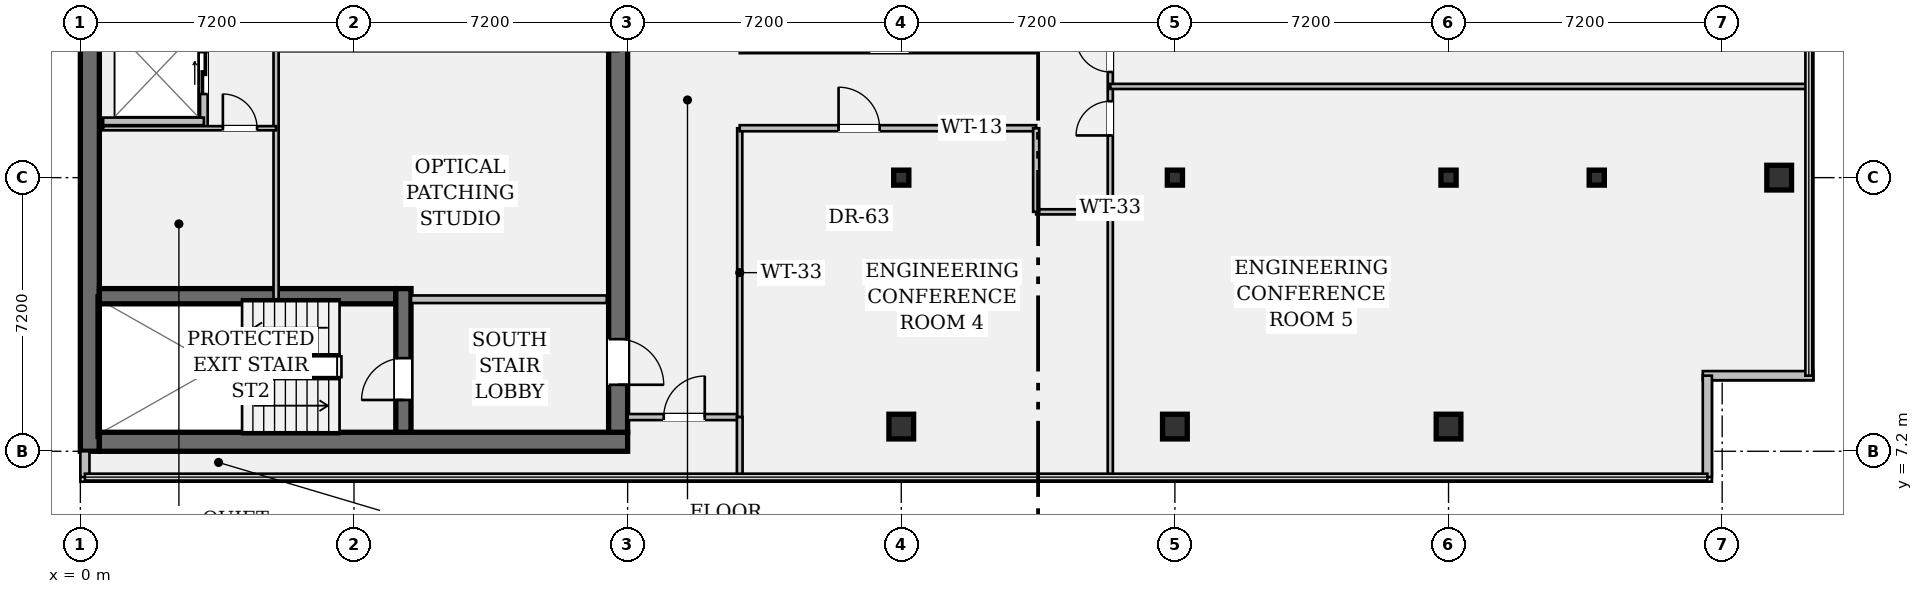
"""IFC4 building model, lengths in metres.
Left out: names, types, materials, properties, quantities, classifications, styles, units other than length and angle.
Written with IfcOpenShell. Run it as: python <this file> out.ifc"""

import sys

from ifc_helpers import new_model, si_unit, direction, frame, frame_2d, origin, origin_2d, place, context, subcontext, project, spatial, rectangle, hollow_rectangle, i_section, extrude, element, fill, save


model = new_model("IFC4")
c1 = context("Model", 3, precision=1e-05, world=origin(), true_north=direction((0.0, 1.0)))
c2 = subcontext(c1, "Body", "Model", "MODEL_VIEW")
j1 = project(units=[si_unit("LENGTHUNIT", "METRE"), si_unit("PLANEANGLEUNIT", "RADIAN")], contexts=[c1])
p1 = place(None, origin())
s1 = spatial("IfcSite", under=j1, at=p1, CompositionType="ELEMENT")
p2 = place(p1, origin())
s2 = spatial("IfcBuilding", under=s1, at=p2, CompositionType="ELEMENT")
p3 = place(p2, frame((0.0, 0.0, 279.65)))
s3 = spatial("IfcBuildingStorey", under=s2, at=p3, CompositionType="ELEMENT", Elevation=279.65)
p4 = place(p3, frame((0.25, 7.2, 0.0), z_axis=(0.0, 0.0, 1.0), x_axis=(0.0, 1.0, 0.0)))
e1 = element("IfcWall", 1, at=p4, inside=s3, PredefinedType="SHEAR", context=c2, shape_type="SweptSolid", body=[
    extrude(rectangle(XDim=28.8, YDim=0.5, at=frame_2d((14.4, 0.0))), origin(), (0.0, 0.0, 1.0), 3.24),
])
p5 = place(p3, frame((0.5, 7.45, 0.0), z_axis=(0.0, 0.0, 1.0), x_axis=(1.0, 0.0, 0.0)))
e2 = element("IfcWall", 2, at=p5, inside=s3, PredefinedType="SHEAR", context=c2, shape_type="SweptSolid", body=[
    extrude(rectangle(XDim=13.9, YDim=0.5, at=frame_2d((6.95, 0.0))), origin(), (0.0, 0.0, 1.0), 3.24),
])
p6 = place(p3, frame((14.15, 35.5, 0.0), z_axis=(0.0, 0.0, 1.0), x_axis=(0.0, -1.0, 0.0)))
e3 = element("IfcWall", 3, at=p6, inside=s3, PredefinedType="SHEAR", context=c2, shape_type="SweptSolid", body=[
    extrude(rectangle(XDim=27.8, YDim=0.5, at=frame_2d((13.9, 0.0))), origin(), (0.0, 0.0, 1.0), 3.24),
])
p7 = place(p6, frame((1.4, 0.0, 0.0)))
e4 = element("IfcOpeningElement", 4, at=p7, cuts=e3, PredefinedType="OPENING", context=c2, shape_type="SweptSolid", body=[
    extrude(rectangle(XDim=1.2, YDim=2.15, at=frame_2d((0.6, 1.075))), frame((0.0, 0.262, 0.0), z_axis=(0.0, -1.0, 0.0), x_axis=(1.0, 0.0, 0.0)), (0.0, 0.0, 1.0), 0.524),
])
p8 = place(p6, frame((25.35, 0.0, 0.0)))
e5 = element("IfcOpeningElement", 5, at=p8, cuts=e3, PredefinedType="OPENING", context=c2, shape_type="SweptSolid", body=[
    extrude(rectangle(XDim=1.2, YDim=2.15, at=frame_2d((0.6, 1.075))), frame((0.0, 0.262, 0.0), z_axis=(0.0, -1.0, 0.0), x_axis=(1.0, 0.0, 0.0)), (0.0, 0.0, 1.0), 0.524),
])
p9 = place(p6, frame((14.7, 0.0, 0.0)))
e6 = element("IfcOpeningElement", 6, at=p9, cuts=e3, PredefinedType="OPENING", context=c2, shape_type="SweptSolid", body=[
    extrude(rectangle(XDim=1.6, YDim=2.2, at=frame_2d((0.8, 1.1))), frame((0.0, 0.262, 0.0), z_axis=(0.0, -1.0, 0.0), x_axis=(1.0, 0.0, 0.0)), (0.0, 0.0, 1.0), 0.524),
])
p10 = place(p3, frame((0.5, 11.28, 0.0), z_axis=(0.0, 0.0, 1.0), x_axis=(1.0, 0.0, 0.0)))
e7 = element("IfcWall", 7, at=p10, inside=s3, PredefinedType="SHEAR", context=c2, shape_type="SweptSolid", body=[
    extrude(rectangle(XDim=7.8, YDim=0.4, at=frame_2d((3.9, 0.0))), origin(), (0.0, 0.0, 1.0), 3.24),
])
p11 = place(p3, frame((8.5, 7.7, 0.0), z_axis=(0.0, 0.0, 1.0), x_axis=(0.0, 1.0, 0.0)))
e8 = element("IfcWall", 8, at=p11, inside=s3, PredefinedType="SHEAR", context=c2, shape_type="SweptSolid", body=[
    extrude(rectangle(XDim=3.78, YDim=0.4, at=frame_2d((1.89, 0.0))), origin(), (0.0, 0.0, 1.0), 3.24),
])
p12 = place(p11, frame((0.85, 0.0, 0.0)))
e9 = element("IfcOpeningElement", 9, at=p12, cuts=e8, PredefinedType="OPENING", context=c2, shape_type="SweptSolid", body=[
    extrude(rectangle(XDim=1.1, YDim=2.15, at=frame_2d((0.55, 1.075))), frame((0.0, 0.212, 0.0), z_axis=(0.0, -1.0, 0.0), x_axis=(1.0, 0.0, 0.0)), (0.0, 0.0, 1.0), 0.424),
])
p13 = place(p3, frame((21.6, 7.85, 0.0), z_axis=(0.0, 0.0, 1.0), x_axis=(1.0, 0.0, 0.0)))
e10 = element("IfcColumn", 10, at=p13, inside=s3, PredefinedType="COLUMN", context=c2, shape_type="SweptSolid", body=[
    extrude(hollow_rectangle(XDim=0.65, YDim=0.65, WallThickness=0.04, at=origin_2d()), origin(), (0.0, 0.0, 1.0), 3.24),
])
p14 = place(p3, frame((21.6, 14.4, 0.0), z_axis=(0.0, 0.0, 1.0), x_axis=(1.0, 0.0, 0.0)))
e11 = element("IfcColumn", 11, at=p14, inside=s3, PredefinedType="COLUMN", context=c2, shape_type="SweptSolid", body=[
    extrude(i_section(OverallWidth=0.399, OverallDepth=0.394, WebThickness=0.023, FlangeThickness=0.037, FilletRadius=0.018, at=origin_2d()), origin(), (0.0, 0.0, 1.0), 3.24),
])
p15 = place(p3, frame((28.8, 7.85, 0.0), z_axis=(0.0, 0.0, 1.0), x_axis=(1.0, 0.0, 0.0)))
e12 = element("IfcColumn", 12, at=p15, inside=s3, PredefinedType="COLUMN", context=c2, shape_type="SweptSolid", body=[
    extrude(hollow_rectangle(XDim=0.65, YDim=0.65, WallThickness=0.04, at=origin_2d()), origin(), (0.0, 0.0, 1.0), 3.24),
])
p16 = place(p3, frame((28.8, 14.4, 0.0), z_axis=(0.0, 0.0, 1.0), x_axis=(1.0, 0.0, 0.0)))
e13 = element("IfcColumn", 13, at=p16, inside=s3, PredefinedType="COLUMN", context=c2, shape_type="SweptSolid", body=[
    extrude(i_section(OverallWidth=0.399, OverallDepth=0.394, WebThickness=0.023, FlangeThickness=0.037, FilletRadius=0.018, at=origin_2d()), origin(), (0.0, 0.0, 1.0), 3.24),
])
p17 = place(p3, frame((36.0, 7.85, 0.0), z_axis=(0.0, 0.0, 1.0), x_axis=(1.0, 0.0, 0.0)))
e14 = element("IfcColumn", 14, at=p17, inside=s3, PredefinedType="COLUMN", context=c2, shape_type="SweptSolid", body=[
    extrude(hollow_rectangle(XDim=0.65, YDim=0.65, WallThickness=0.04, at=origin_2d()), origin(), (0.0, 0.0, 1.0), 3.24),
])
for number, where, z_axis, x_axis in (
    (15, (36.0, 14.4, 0.0), (0.0, 0.0, 1.0), (1.0, 0.0, 0.0)),
    (16, (39.9, 14.4, 0.0), (0.0, 0.0, 1.0), (1.0, 0.0, 0.0)),
):
    element("IfcColumn", number, at=place(p3, frame(where, z_axis=z_axis, x_axis=x_axis)), inside=s3, PredefinedType="COLUMN", context=c2, shape_type="SweptSolid", body=[
        extrude(i_section(OverallWidth=0.399, OverallDepth=0.394, WebThickness=0.023, FlangeThickness=0.037, FilletRadius=0.018, at=origin_2d()), origin(), (0.0, 0.0, 1.0), 3.24),
    ])
p18 = place(p3, frame((44.7, 14.4, 0.0), z_axis=(0.0, 0.0, 1.0), x_axis=(1.0, 0.0, 0.0)))
e17 = element("IfcColumn", 17, at=p18, inside=s3, PredefinedType="COLUMN", context=c2, shape_type="SweptSolid", body=[
    extrude(hollow_rectangle(XDim=0.65, YDim=0.65, WallThickness=0.04, at=origin_2d()), origin(), (0.0, 0.0, 1.0), 3.24),
])
p19 = place(p3, frame((0.12, 6.52, 0.0), z_axis=(0.0, 0.0, 1.0), x_axis=(0.0, 1.0, 0.0)))
e18 = element("IfcWall", 18, at=p19, inside=s3, PredefinedType="STANDARD", context=c2, shape_type="SweptSolid", body=[
    extrude(rectangle(XDim=0.68, YDim=0.24, at=frame_2d((0.34, 0.0))), origin(), (0.0, 0.0, 1.0), 3.24),
])
p20 = place(p3, frame((45.6, 9.19, 0.0), z_axis=(0.0, 0.0, 1.0), x_axis=(-1.0, 0.0, 0.0)))
e19 = element("IfcWall", 19, at=p20, inside=s3, PredefinedType="STANDARD", context=c2, shape_type="SweptSolid", body=[
    extrude(rectangle(XDim=2.91, YDim=0.24, at=frame_2d((1.455, 0.0))), origin(), (0.0, 0.0, 1.0), 3.24),
])
p21 = place(p3, frame((42.81, 9.19, 0.0), z_axis=(0.0, 0.0, 1.0), x_axis=(0.0, -1.0, 0.0)))
e20 = element("IfcWall", 20, at=p21, inside=s3, PredefinedType="STANDARD", context=c2, shape_type="SweptSolid", body=[
    extrude(rectangle(XDim=2.67, YDim=0.24, at=frame_2d((1.335, 0.0))), origin(), (0.0, 0.0, 1.0), 3.24),
])
p22 = place(p3, frame((8.7, 11.2, 0.0), z_axis=(0.0, 0.0, 1.0), x_axis=(1.0, 0.0, 0.0)))
e21 = element("IfcWall", 21, at=p22, inside=s3, PredefinedType="PARTITIONING", context=c2, shape_type="SweptSolid", body=[
    extrude(rectangle(XDim=5.15, YDim=0.2, at=frame_2d((2.575, 0.0))), origin(), (0.0, 0.0, 1.0), 3.24),
])
p23 = place(p3, frame((3.25, 15.7, 0.0), z_axis=(0.0, 0.0, 1.0), x_axis=(0.0, 1.0, 0.0)))
e22 = element("IfcWall", 22, at=p23, inside=s3, PredefinedType="PARTITIONING", context=c2, shape_type="SweptSolid", body=[
    extrude(rectangle(XDim=13.08, YDim=0.2, at=frame_2d((6.54, 0.0))), origin(), (0.0, 0.0, 1.0), 3.24),
])
p24 = place(p23, frame((0.9, 0.0, 0.0)))
e23 = element("IfcOpeningElement", 23, at=p24, cuts=e22, PredefinedType="OPENING", context=c2, shape_type="SweptSolid", body=[
    extrude(rectangle(XDim=1.1, YDim=2.2, at=frame_2d((0.55, 1.1))), frame((0.0, 0.112, 0.0), z_axis=(0.0, -1.0, 0.0), x_axis=(1.0, 0.0, 0.0)), (0.0, 0.0, 1.0), 0.224),
])
p25 = place(p23, frame((3.5, 0.0, 0.0)))
e24 = element("IfcOpeningElement", 24, at=p25, cuts=e22, PredefinedType="OPENING", context=c2, shape_type="SweptSolid", body=[
    extrude(rectangle(XDim=1.1, YDim=2.2, at=frame_2d((0.55, 1.1))), frame((0.0, 0.112, 0.0), z_axis=(0.0, -1.0, 0.0), x_axis=(1.0, 0.0, 0.0)), (0.0, 0.0, 1.0), 0.224),
])
p26 = place(p23, frame((7.2, 0.0, 0.0)))
e25 = element("IfcOpeningElement", 25, at=p26, cuts=e22, PredefinedType="OPENING", context=c2, shape_type="SweptSolid", body=[
    extrude(rectangle(XDim=1.1, YDim=2.2, at=frame_2d((0.55, 1.1))), frame((0.0, 0.112, 0.0), z_axis=(0.0, -1.0, 0.0), x_axis=(1.0, 0.0, 0.0)), (0.0, 0.0, 1.0), 0.224),
])
p27 = place(p23, frame((9.8, 0.0, 0.0)))
e26 = element("IfcOpeningElement", 26, at=p27, cuts=e22, PredefinedType="OPENING", context=c2, shape_type="SweptSolid", body=[
    extrude(rectangle(XDim=1.1, YDim=2.2, at=frame_2d((0.55, 1.1))), frame((0.0, 0.112, 0.0), z_axis=(0.0, -1.0, 0.0), x_axis=(1.0, 0.0, 0.0)), (0.0, 0.0, 1.0), 0.224),
])
p28 = place(p3, frame((0.6, 15.88, 0.0), z_axis=(0.0, 0.0, 1.0), x_axis=(1.0, 0.0, 0.0)))
e27 = element("IfcWall", 27, at=p28, inside=s3, PredefinedType="PARTITIONING", context=c2, shape_type="SweptSolid", body=[
    extrude(rectangle(XDim=2.65, YDim=0.2, at=frame_2d((1.325, 0.0))), origin(), (0.0, 0.0, 1.0), 3.24),
])
p29 = place(p3, frame((5.15, 11.2, 0.0), z_axis=(0.0, 0.0, 1.0), x_axis=(0.0, 1.0, 0.0)))
e28 = element("IfcWall", 28, at=p29, inside=s3, PredefinedType="PARTITIONING", context=c2, shape_type="SweptSolid", body=[
    extrude(rectangle(XDim=6.6, YDim=0.135, at=frame_2d((3.3, 0.0))), origin(), (0.0, 0.0, 1.0), 3.24),
])
p30 = place(p3, frame((0.6, 15.7, 0.0), z_axis=(0.0, 0.0, 1.0), x_axis=(1.0, 0.0, 0.0)))
e29 = element("IfcWall", 29, at=p30, inside=s3, PredefinedType="PARTITIONING", context=c2, shape_type="SweptSolid", body=[
    extrude(rectangle(XDim=4.55, YDim=0.11, at=frame_2d((2.275, 0.0))), origin(), (0.0, 0.0, 1.0), 3.24),
])
p31 = place(p30, frame((3.15, 0.0, 0.0)))
e30 = element("IfcOpeningElement", 30, at=p31, cuts=e29, PredefinedType="OPENING", context=c2, shape_type="SweptSolid", body=[
    extrude(rectangle(XDim=0.9, YDim=2.15, at=frame_2d((0.45, 1.075))), frame((0.0, 0.067, 0.0), z_axis=(0.0, -1.0, 0.0), x_axis=(1.0, 0.0, 0.0)), (0.0, 0.0, 1.0), 0.134),
])
p32 = place(p3, frame((14.4, 8.1, 0.0), z_axis=(0.0, 0.0, 1.0), x_axis=(1.0, 0.0, 0.0)))
e31 = element("IfcWall", 31, at=p32, inside=s3, PredefinedType="PARTITIONING", context=c2, shape_type="SweptSolid", body=[
    extrude(rectangle(XDim=2.95, YDim=0.16, at=frame_2d((1.475, 0.0))), origin(), (0.0, 0.0, 1.0), 3.24),
])
p33 = place(p32, frame((0.95, 0.0, 0.0)))
e32 = element("IfcOpeningElement", 32, at=p33, cuts=e31, PredefinedType="OPENING", context=c2, shape_type="SweptSolid", body=[
    extrude(rectangle(XDim=1.08, YDim=2.15, at=frame_2d((0.54, 1.075))), frame((0.0, 0.092, 0.0), z_axis=(0.0, -1.0, 0.0), x_axis=(1.0, 0.0, 0.0)), (0.0, 0.0, 1.0), 0.184),
])
p34 = place(p3, frame((17.35, 8.1, 0.0), z_axis=(0.0, 0.0, 1.0), x_axis=(0.0, 1.0, 0.0)))
e33 = element("IfcWall", 33, at=p34, inside=s3, PredefinedType="PARTITIONING", context=c2, shape_type="SweptSolid", body=[
    extrude(rectangle(XDim=7.6, YDim=0.135, at=frame_2d((3.8, 0.0))), origin(), (0.0, 0.0, 1.0), 2.676),
])
p35 = place(p3, frame((17.35, 15.7, 0.0), z_axis=(0.0, 0.0, 1.0), x_axis=(1.0, 0.0, 0.0)))
e34 = element("IfcWall", 34, at=p35, inside=s3, PredefinedType="PARTITIONING", context=c2, shape_type="SweptSolid", body=[
    extrude(rectangle(XDim=7.8, YDim=0.16, at=frame_2d((3.9, 0.0))), origin(), (0.0, 0.0, 1.0), 2.676),
])
p36 = place(p35, frame((2.6, 0.0, 0.0)))
e35 = element("IfcOpeningElement", 35, at=p36, cuts=e34, PredefinedType="OPENING", context=c2, shape_type="SweptSolid", body=[
    extrude(rectangle(XDim=1.08, YDim=2.15, at=frame_2d((0.54, 1.075))), frame((0.0, 0.092, 0.0), z_axis=(0.0, -1.0, 0.0), x_axis=(1.0, 0.0, 0.0)), (0.0, 0.0, 1.0), 0.184),
])
p37 = place(p3, frame((17.35, 17.75, 0.0), z_axis=(0.0, 0.0, 1.0), x_axis=(1.0, 0.0, 0.0)))
e36 = element("IfcWall", 36, at=p37, inside=s3, PredefinedType="PARTITIONING", context=c2, shape_type="SweptSolid", body=[
    extrude(rectangle(XDim=7.8, YDim=0.15, at=frame_2d((3.9, 0.0))), origin(), (0.0, 0.0, 1.0), 2.676),
])
p38 = place(p37, frame((3.4, 0.0, 0.0)))
e37 = element("IfcOpeningElement", 37, at=p38, cuts=e36, PredefinedType="OPENING", context=c2, shape_type="SweptSolid", body=[
    extrude(rectangle(XDim=1.08, YDim=2.15, at=frame_2d((0.54, 1.075))), frame((0.0, 0.087, 0.0), z_axis=(0.0, -1.0, 0.0), x_axis=(1.0, 0.0, 0.0)), (0.0, 0.0, 1.0), 0.174),
])
p39 = place(p3, frame((25.15, 13.5, 0.0), z_axis=(0.0, 0.0, 1.0), x_axis=(1.0, 0.0, 0.0)))
e38 = element("IfcWall", 38, at=p39, inside=s3, PredefinedType="PARTITIONING", context=c2, shape_type="SweptSolid", body=[
    extrude(rectangle(XDim=1.95, YDim=0.135, at=frame_2d((0.975, 0.0))), origin(), (0.0, 0.0, 1.0), 2.808),
])
p40 = place(p3, frame((25.15, 13.5, 0.0), z_axis=(0.0, 0.0, 1.0), x_axis=(0.0, 1.0, 0.0)))
e39 = element("IfcWall", 39, at=p40, inside=s3, PredefinedType="PARTITIONING", context=c2, shape_type="SweptSolid", body=[
    extrude(rectangle(XDim=2.2, YDim=0.16, at=frame_2d((1.1, 0.0))), origin(), (0.0, 0.0, 1.0), 2.676),
])
p41 = place(p3, frame((27.1, 6.52, 0.0), z_axis=(0.0, 0.0, 1.0), x_axis=(0.0, 1.0, 0.0)))
e40 = element("IfcWall", 40, at=p41, inside=s3, PredefinedType="PARTITIONING", context=c2, shape_type="SweptSolid", body=[
    extrude(rectangle(XDim=18.56, YDim=0.135, at=frame_2d((9.28, 0.0))), origin(), (0.0, 0.0, 1.0), 2.676),
])
p42 = place(p41, frame((8.99, 0.0, 0.0)))
e41 = element("IfcOpeningElement", 41, at=p42, cuts=e40, PredefinedType="OPENING", context=c2, shape_type="SweptSolid", body=[
    extrude(rectangle(XDim=0.9, YDim=2.15, at=frame_2d((0.45, 1.075))), frame((0.0, 0.08, 0.0), z_axis=(0.0, -1.0, 0.0), x_axis=(1.0, 0.0, 0.0)), (0.0, 0.0, 1.0), 0.159),
])
p43 = place(p41, frame((10.66, 0.0, 0.0)))
e42 = element("IfcOpeningElement", 42, at=p43, cuts=e40, PredefinedType="OPENING", context=c2, shape_type="SweptSolid", body=[
    extrude(rectangle(XDim=0.9, YDim=2.15, at=frame_2d((0.45, 1.075))), frame((0.0, 0.08, 0.0), z_axis=(0.0, -1.0, 0.0), x_axis=(1.0, 0.0, 0.0)), (0.0, 0.0, 1.0), 0.159),
])
p44 = place(p3, frame((17.35, 6.52, 0.0), z_axis=(0.0, 0.0, 1.0), x_axis=(0.0, 1.0, 0.0)))
e43 = element("IfcWall", 43, at=p44, inside=s3, PredefinedType="PARTITIONING", context=c2, shape_type="SweptSolid", body=[
    extrude(rectangle(XDim=1.58, YDim=0.15, at=frame_2d((0.79, 0.0))), origin(), (0.0, 0.0, 1.0), 3.24),
])
p45 = place(p3, frame((27.1, 16.8, 0.0), z_axis=(0.0, 0.0, 1.0), x_axis=(1.0, 0.0, 0.0)))
e44 = element("IfcWall", 44, at=p45, inside=s3, PredefinedType="PARTITIONING", context=c2, shape_type="SweptSolid", body=[
    extrude(rectangle(XDim=18.38, YDim=0.135, at=frame_2d((9.19, 0.0))), origin(), (0.0, 0.0, 1.0), 2.676),
])
p46 = place(p12, origin())
e45 = element("IfcDoor", 45, at=p46, inside=s3, OperationType="SINGLE_SWING_LEFT", PredefinedType="DOOR", context=c2, shape_type="SweptSolid", body=[
    extrude(rectangle(XDim=1.1, YDim=2.15, at=frame_2d((0.55, 1.075))), frame((0.0, 0.025, 0.0), z_axis=(0.0, -1.0, 0.0), x_axis=(1.0, 0.0, 0.0)), (0.0, 0.0, 1.0), 0.05),
])
fill(e9, e45)
p47 = place(p8, origin())
e46 = element("IfcDoor", 46, at=p47, inside=s3, OperationType="SINGLE_SWING_RIGHT", PredefinedType="DOOR", context=c2, shape_type="SweptSolid", body=[
    extrude(rectangle(XDim=1.2, YDim=2.15, at=frame_2d((0.6, 1.075))), frame((0.0, 0.025, 0.0), z_axis=(0.0, -1.0, 0.0), x_axis=(1.0, 0.0, 0.0)), (0.0, 0.0, 1.0), 0.05),
])
fill(e5, e46)
p48 = place(p24, origin())
e47 = element("IfcDoor", 47, at=p48, inside=s3, OperationType="DOUBLE_DOOR_SLIDING", PredefinedType="DOOR", context=c2, shape_type="SweptSolid", body=[
    extrude(rectangle(XDim=1.1, YDim=2.2, at=frame_2d((0.55, 1.1))), frame((0.0, 0.025, 0.0), z_axis=(0.0, -1.0, 0.0), x_axis=(1.0, 0.0, 0.0)), (0.0, 0.0, 1.0), 0.05),
])
fill(e23, e47)
p49 = place(p31, origin())
e48 = element("IfcDoor", 48, at=p49, inside=s3, OperationType="SINGLE_SWING_LEFT", PredefinedType="DOOR", context=c2, shape_type="SweptSolid", body=[
    extrude(rectangle(XDim=0.9, YDim=2.15, at=frame_2d((0.45, 1.075))), frame((0.0, 0.025, 0.0), z_axis=(0.0, -1.0, 0.0), x_axis=(1.0, 0.0, 0.0)), (0.0, 0.0, 1.0), 0.05),
])
fill(e30, e48)
p50 = place(p33, origin())
e49 = element("IfcDoor", 49, at=p50, inside=s3, OperationType="SINGLE_SWING_RIGHT", PredefinedType="DOOR", context=c2, shape_type="SweptSolid", body=[
    extrude(rectangle(XDim=1.08, YDim=2.15, at=frame_2d((0.54, 1.075))), frame((0.0, 0.025, 0.0), z_axis=(0.0, -1.0, 0.0), x_axis=(1.0, 0.0, 0.0)), (0.0, 0.0, 1.0), 0.05),
])
fill(e32, e49)
p51 = place(p36, origin())
e50 = element("IfcDoor", 50, at=p51, inside=s3, OperationType="SINGLE_SWING_LEFT", PredefinedType="DOOR", context=c2, shape_type="SweptSolid", body=[
    extrude(rectangle(XDim=1.08, YDim=2.15, at=frame_2d((0.54, 1.075))), frame((0.0, 0.025, 0.0), z_axis=(0.0, -1.0, 0.0), x_axis=(1.0, 0.0, 0.0)), (0.0, 0.0, 1.0), 0.05),
])
fill(e35, e50)
p52 = place(p42, origin())
e51 = element("IfcDoor", 51, at=p52, inside=s3, OperationType="SINGLE_SWING_LEFT", PredefinedType="DOOR", context=c2, shape_type="SweptSolid", body=[
    extrude(rectangle(XDim=0.9, YDim=2.15, at=frame_2d((0.45, 1.075))), frame((0.0, 0.025, 0.0), z_axis=(0.0, -1.0, 0.0), x_axis=(1.0, 0.0, 0.0)), (0.0, 0.0, 1.0), 0.05),
])
fill(e41, e51)
p53 = place(p43, origin())
e52 = element("IfcDoor", 52, at=p53, inside=s3, OperationType="SINGLE_SWING_RIGHT", PredefinedType="DOOR", context=c2, shape_type="SweptSolid", body=[
    extrude(rectangle(XDim=0.9, YDim=2.15, at=frame_2d((0.45, 1.075))), frame((0.0, 0.025, 0.0), z_axis=(0.0, -1.0, 0.0), x_axis=(1.0, 0.0, 0.0)), (0.0, 0.0, 1.0), 0.05),
])
fill(e42, e52)
save(model, sys.argv[1])
